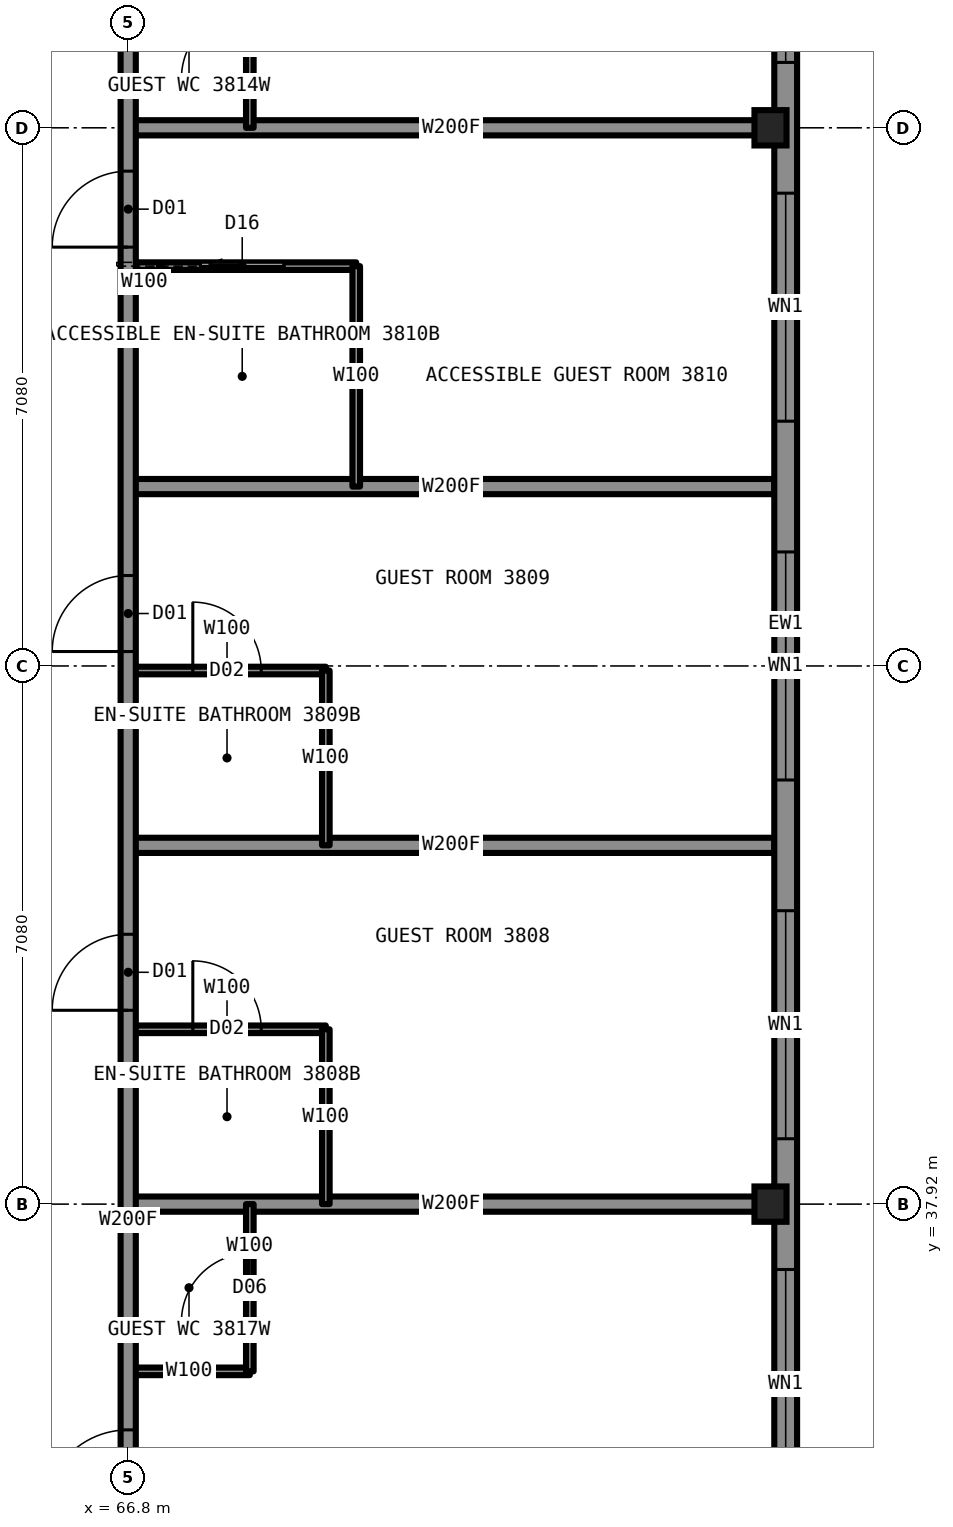
"""IFC4 building model, lengths in metres.
Left out: names, types, materials, properties, quantities, classifications, styles, units other than length and angle.
Written with IfcOpenShell. Run it as: python <this file> out.ifc"""

import sys

from ifc_helpers import new_model, si_unit, direction, frame, frame_2d, origin, origin_2d, place, context, subcontext, project, spatial, rectangle, i_section, extrude, element, fill, save


model = new_model("IFC4")
c1 = context("Model", 3, precision=1e-05, world=origin(), true_north=direction((0.0, 1.0)))
c2 = subcontext(c1, "Body", "Model", "MODEL_VIEW")
j1 = project(units=[si_unit("LENGTHUNIT", "METRE"), si_unit("PLANEANGLEUNIT", "RADIAN")], contexts=[c1])
p1 = place(None, origin())
s1 = spatial("IfcSite", under=j1, at=p1, CompositionType="ELEMENT")
p2 = place(p1, origin())
s2 = spatial("IfcBuilding", under=s1, at=p2, CompositionType="ELEMENT")
p3 = place(p2, frame((0.0, 0.0, 135.4)))
s3 = spatial("IfcBuildingStorey", under=s2, at=p3, CompositionType="ELEMENT", Elevation=135.4)
for number, where, z_axis, x_axis in (
    (1, (75.25, 37.92, 0.0), (0.0, 0.0, 1.0), (1.0, 0.0, 0.0)),
    (2, (75.25, 52.08, 0.0), (0.0, 0.0, 1.0), (1.0, 0.0, 0.0)),
):
    element("IfcColumn", number, at=place(p3, frame(where, z_axis=z_axis, x_axis=x_axis)), inside=s3, PredefinedType="COLUMN", context=c2, shape_type="SweptSolid", body=[
        extrude(i_section(OverallWidth=0.422, OverallDepth=0.465, WebThickness=0.045, FlangeThickness=0.073, at=origin_2d()), origin(), (0.0, 0.0, 1.0), 3.5),
    ])
p4 = place(p3, frame((66.8, 44.94, 0.0), z_axis=(0.0, 0.0, 1.0), x_axis=(1.0, 0.0, 0.0)))
e3 = element("IfcWall", 3, at=p4, inside=s3, PredefinedType="PARTITIONING", context=c2, shape_type="SweptSolid", body=[
    extrude(rectangle(XDim=2.6, YDim=0.1, at=frame_2d((1.3, 0.0))), origin(), (0.0, 0.0, 1.0), 2.731),
])
p5 = place(p4, frame((0.85, 0.0, 0.0)))
e4 = element("IfcOpeningElement", 4, at=p5, cuts=e3, PredefinedType="OPENING", context=c2, shape_type="SweptSolid", body=[
    extrude(rectangle(XDim=0.9, YDim=2.1, at=frame_2d((0.45, 1.05))), frame((0.0, 0.06, 0.0), z_axis=(0.0, -1.0, 0.0), x_axis=(1.0, 0.0, 0.0)), (0.0, 0.0, 1.0), 0.12),
])
p6 = place(p3, frame((66.8, 42.64, 0.0), z_axis=(0.0, 0.0, 1.0), x_axis=(1.0, 0.0, 0.0)))
e5 = element("IfcWall", 5, at=p6, inside=s3, PredefinedType="PARTITIONING", context=c2, shape_type="SweptSolid", body=[
    extrude(rectangle(XDim=8.5, YDim=0.2, at=frame_2d((4.25, 0.0))), origin(), (0.0, 0.0, 1.0), 2.731),
])
p7 = place(p3, frame((66.8, 40.22, 0.0), z_axis=(0.0, 0.0, 1.0), x_axis=(1.0, 0.0, 0.0)))
e6 = element("IfcWall", 6, at=p7, inside=s3, PredefinedType="PARTITIONING", context=c2, shape_type="SweptSolid", body=[
    extrude(rectangle(XDim=2.6, YDim=0.1, at=frame_2d((1.3, 0.0))), origin(), (0.0, 0.0, 1.0), 2.731),
])
p8 = place(p7, frame((0.85, 0.0, 0.0)))
e7 = element("IfcOpeningElement", 7, at=p8, cuts=e6, PredefinedType="OPENING", context=c2, shape_type="SweptSolid", body=[
    extrude(rectangle(XDim=0.9, YDim=2.1, at=frame_2d((0.45, 1.05))), frame((0.0, 0.06, 0.0), z_axis=(0.0, -1.0, 0.0), x_axis=(1.0, 0.0, 0.0)), (0.0, 0.0, 1.0), 0.12),
])
p9 = place(p3, frame((66.8, 37.92, 0.0), z_axis=(0.0, 0.0, 1.0), x_axis=(1.0, 0.0, 0.0)))
e8 = element("IfcWall", 8, at=p9, inside=s3, PredefinedType="PARTITIONING", context=c2, shape_type="SweptSolid", body=[
    extrude(rectangle(XDim=8.5, YDim=0.2, at=frame_2d((4.25, 0.0))), origin(), (0.0, 0.0, 1.0), 2.573),
])
p10 = place(p3, frame((66.8, 35.72, 0.0), z_axis=(0.0, 0.0, 1.0), x_axis=(1.0, 0.0, 0.0)))
e9 = element("IfcWall", 9, at=p10, inside=s3, PredefinedType="PARTITIONING", context=c2, shape_type="SweptSolid", body=[
    extrude(rectangle(XDim=1.6, YDim=0.1, at=frame_2d((0.8, 0.0))), origin(), (0.0, 0.0, 1.0), 3.33),
])
p11 = place(p3, frame((66.8, 47.36, 0.0), z_axis=(0.0, 0.0, 1.0), x_axis=(1.0, 0.0, 0.0)))
e10 = element("IfcWall", 10, at=p11, inside=s3, PredefinedType="PARTITIONING", context=c2, shape_type="SweptSolid", body=[
    extrude(rectangle(XDim=8.5, YDim=0.2, at=frame_2d((4.25, 0.0))), origin(), (0.0, 0.0, 1.0), 2.731),
])
p12 = place(p3, frame((66.8, 50.26, 0.0), z_axis=(0.0, 0.0, 1.0), x_axis=(1.0, 0.0, 0.0)))
e11 = element("IfcWall", 11, at=p12, inside=s3, PredefinedType="PARTITIONING", context=c2, shape_type="SweptSolid", body=[
    extrude(rectangle(XDim=3.0, YDim=0.1, at=frame_2d((1.5, 0.0))), origin(), (0.0, 0.0, 1.0), 3.33),
])
p13 = place(p12, frame((0.95, 0.0, 0.0)))
e12 = element("IfcOpeningElement", 12, at=p13, cuts=e11, PredefinedType="OPENING", context=c2, shape_type="SweptSolid", body=[
    extrude(rectangle(XDim=1.1, YDim=2.1, at=frame_2d((0.55, 1.05))), frame((0.0, 0.06, 0.0), z_axis=(0.0, -1.0, 0.0), x_axis=(1.0, 0.0, 0.0)), (0.0, 0.0, 1.0), 0.12),
])
p14 = place(p3, frame((66.8, 52.08, 0.0), z_axis=(0.0, 0.0, 1.0), x_axis=(1.0, 0.0, 0.0)))
e13 = element("IfcWall", 13, at=p14, inside=s3, PredefinedType="PARTITIONING", context=c2, shape_type="SweptSolid", body=[
    extrude(rectangle(XDim=8.5, YDim=0.2, at=frame_2d((4.25, 0.0))), origin(), (0.0, 0.0, 1.0), 2.573),
])
p15 = place(p3, frame((66.8, 33.2, 0.0), z_axis=(0.0, 0.0, 1.0), x_axis=(0.0, 1.0, 0.0)))
e14 = element("IfcWall", 14, at=p15, inside=s3, PredefinedType="PARTITIONING", context=c2, shape_type="SweptSolid", body=[
    extrude(rectangle(XDim=23.6, YDim=0.2, at=frame_2d((11.8, 0.0))), origin(), (0.0, 0.0, 1.0), 3.33),
])
p16 = place(p15, frame((7.27, 0.0, 0.0)))
e15 = element("IfcOpeningElement", 15, at=p16, cuts=e14, PredefinedType="OPENING", context=c2, shape_type="SweptSolid", body=[
    extrude(rectangle(XDim=1.0, YDim=2.2, at=frame_2d((0.5, 1.1))), frame((0.0, 0.11, 0.0), z_axis=(0.0, -1.0, 0.0), x_axis=(1.0, 0.0, 0.0)), (0.0, 0.0, 1.0), 0.22),
])
p17 = place(p15, frame((11.99, 0.0, 0.0)))
e16 = element("IfcOpeningElement", 16, at=p17, cuts=e14, PredefinedType="OPENING", context=c2, shape_type="SweptSolid", body=[
    extrude(rectangle(XDim=1.0, YDim=2.2, at=frame_2d((0.5, 1.1))), frame((0.0, 0.11, 0.0), z_axis=(0.0, -1.0, 0.0), x_axis=(1.0, 0.0, 0.0)), (0.0, 0.0, 1.0), 0.22),
])
p18 = place(p15, frame((17.31, 0.0, 0.0)))
e17 = element("IfcOpeningElement", 17, at=p18, cuts=e14, PredefinedType="OPENING", context=c2, shape_type="SweptSolid", body=[
    extrude(rectangle(XDim=1.0, YDim=2.2, at=frame_2d((0.5, 1.1))), frame((0.0, 0.11, 0.0), z_axis=(0.0, -1.0, 0.0), x_axis=(1.0, 0.0, 0.0)), (0.0, 0.0, 1.0), 0.22),
])
p19 = place(p15, frame((21.85, 0.0, 0.0)))
e18 = element("IfcOpeningElement", 18, at=p19, cuts=e14, PredefinedType="OPENING", context=c2, shape_type="SweptSolid", body=[
    extrude(rectangle(XDim=1.1, YDim=2.2, at=frame_2d((0.55, 1.1))), frame((0.0, 0.11, 0.0), z_axis=(0.0, -1.0, 0.0), x_axis=(1.0, 0.0, 0.0)), (0.0, 0.0, 1.0), 0.22),
])
p20 = place(p15, frame((0.65, 0.0, 0.0)))
e19 = element("IfcOpeningElement", 19, at=p20, cuts=e14, PredefinedType="OPENING", context=c2, shape_type="SweptSolid", body=[
    extrude(rectangle(XDim=1.1, YDim=2.2, at=frame_2d((0.55, 1.1))), frame((0.0, 0.11, 0.0), z_axis=(0.0, -1.0, 0.0), x_axis=(1.0, 0.0, 0.0)), (0.0, 0.0, 1.0), 0.22),
])
p21 = place(p3, frame((68.4, 35.72, 0.0), z_axis=(0.0, 0.0, 1.0), x_axis=(0.0, 1.0, 0.0)))
e20 = element("IfcWall", 20, at=p21, inside=s3, PredefinedType="PARTITIONING", context=c2, shape_type="SweptSolid", body=[
    extrude(rectangle(XDim=2.2, YDim=0.1, at=frame_2d((1.1, 0.0))), origin(), (0.0, 0.0, 1.0), 3.33),
])
p22 = place(p21, frame((0.65, 0.0, 0.0)))
e21 = element("IfcOpeningElement", 21, at=p22, cuts=e20, PredefinedType="OPENING", context=c2, shape_type="SweptSolid", body=[
    extrude(rectangle(XDim=0.9, YDim=2.1, at=frame_2d((0.45, 1.05))), frame((0.0, 0.06, 0.0), z_axis=(0.0, -1.0, 0.0), x_axis=(1.0, 0.0, 0.0)), (0.0, 0.0, 1.0), 0.12),
])
p23 = place(p3, frame((68.4, 52.08, 0.0), z_axis=(0.0, 0.0, 1.0), x_axis=(0.0, 1.0, 0.0)))
e22 = element("IfcWall", 22, at=p23, inside=s3, PredefinedType="PARTITIONING", context=c2, shape_type="SweptSolid", body=[
    extrude(rectangle(XDim=2.2, YDim=0.1, at=frame_2d((1.1, 0.0))), origin(), (0.0, 0.0, 1.0), 3.33),
])
p24 = place(p23, frame((0.65, 0.0, 0.0)))
e23 = element("IfcOpeningElement", 23, at=p24, cuts=e22, PredefinedType="OPENING", context=c2, shape_type="SweptSolid", body=[
    extrude(rectangle(XDim=0.9, YDim=2.1, at=frame_2d((0.45, 1.05))), frame((0.0, 0.06, 0.0), z_axis=(0.0, -1.0, 0.0), x_axis=(1.0, 0.0, 0.0)), (0.0, 0.0, 1.0), 0.12),
])
for number, where, z_axis, x_axis in (
    (24, (69.4, 37.92, 0.0), (0.0, 0.0, 1.0), (0.0, 1.0, 0.0)),
    (25, (69.4, 42.64, 0.0), (0.0, 0.0, 1.0), (0.0, 1.0, 0.0)),
):
    element("IfcWall", number, at=place(p3, frame(where, z_axis=z_axis, x_axis=x_axis)), inside=s3, PredefinedType="PARTITIONING", context=c2, shape_type="SweptSolid", body=[
        extrude(rectangle(XDim=2.3, YDim=0.1, at=frame_2d((1.15, 0.0))), origin(), (0.0, 0.0, 1.0), 3.33),
    ])
p25 = place(p3, frame((69.8, 47.36, 0.0), z_axis=(0.0, 0.0, 1.0), x_axis=(0.0, 1.0, 0.0)))
e26 = element("IfcWall", 26, at=p25, inside=s3, PredefinedType="PARTITIONING", context=c2, shape_type="SweptSolid", body=[
    extrude(rectangle(XDim=2.9, YDim=0.1, at=frame_2d((1.45, 0.0))), origin(), (0.0, 0.0, 1.0), 3.33),
])
p26 = place(p3, frame((75.45, 29.9, 0.0), z_axis=(0.0, 0.0, 1.0), x_axis=(0.0, 1.0, 0.0)))
e27 = element("IfcWall", 27, at=p26, inside=s3, PredefinedType="SOLIDWALL", context=c2, shape_type="SweptSolid", body=[
    extrude(rectangle(XDim=30.2, YDim=0.3, at=frame_2d((15.1, 0.0))), origin(), (0.0, 0.0, 1.0), 2.83),
])
p27 = place(p26, frame((0.85, 0.0, 0.5)))
e28 = element("IfcOpeningElement", 28, at=p27, cuts=e27, PredefinedType="OPENING", context=c2, shape_type="SweptSolid", body=[
    extrude(rectangle(XDim=1.6, YDim=2.0, at=frame_2d((0.8, 1.0))), frame((0.0, 0.16, 0.0), z_axis=(0.0, -1.0, 0.0), x_axis=(1.0, 0.0, 0.0)), (0.0, 0.0, 1.0), 0.32),
])
p28 = place(p26, frame((4.16, 0.0, 0.5)))
e29 = element("IfcOpeningElement", 29, at=p28, cuts=e27, PredefinedType="OPENING", context=c2, shape_type="SweptSolid", body=[
    extrude(rectangle(XDim=1.3, YDim=1.9, at=frame_2d((0.65, 0.95))), frame((0.0, 0.16, 0.0), z_axis=(0.0, -1.0, 0.0), x_axis=(1.0, 0.0, 0.0)), (0.0, 0.0, 1.0), 0.32),
])
p29 = place(p26, frame((8.88, 0.0, 0.5)))
e30 = element("IfcOpeningElement", 30, at=p29, cuts=e27, PredefinedType="OPENING", context=c2, shape_type="SweptSolid", body=[
    extrude(rectangle(XDim=3.0, YDim=2.0, at=frame_2d((1.5, 1.0))), frame((0.0, 0.16, 0.0), z_axis=(0.0, -1.0, 0.0), x_axis=(1.0, 0.0, 0.0)), (0.0, 0.0, 1.0), 0.32),
])
p30 = place(p26, frame((13.6, 0.0, 0.5)))
e31 = element("IfcOpeningElement", 31, at=p30, cuts=e27, PredefinedType="OPENING", context=c2, shape_type="SweptSolid", body=[
    extrude(rectangle(XDim=3.0, YDim=2.0, at=frame_2d((1.5, 1.0))), frame((0.0, 0.16, 0.0), z_axis=(0.0, -1.0, 0.0), x_axis=(1.0, 0.0, 0.0)), (0.0, 0.0, 1.0), 0.32),
])
p31 = place(p26, frame((18.32, 0.0, 0.5)))
e32 = element("IfcOpeningElement", 32, at=p31, cuts=e27, PredefinedType="OPENING", context=c2, shape_type="SweptSolid", body=[
    extrude(rectangle(XDim=3.0, YDim=2.0, at=frame_2d((1.5, 1.0))), frame((0.0, 0.16, 0.0), z_axis=(0.0, -1.0, 0.0), x_axis=(1.0, 0.0, 0.0)), (0.0, 0.0, 1.0), 0.32),
])
p32 = place(p26, frame((24.69, 0.0, 0.5)))
e33 = element("IfcOpeningElement", 33, at=p32, cuts=e27, PredefinedType="OPENING", context=c2, shape_type="SweptSolid", body=[
    extrude(rectangle(XDim=1.3, YDim=1.9, at=frame_2d((0.65, 0.95))), frame((0.0, 0.16, 0.0), z_axis=(0.0, -1.0, 0.0), x_axis=(1.0, 0.0, 0.0)), (0.0, 0.0, 1.0), 0.32),
])
p33 = place(p26, frame((27.75, 0.0, 0.5)))
e34 = element("IfcOpeningElement", 34, at=p33, cuts=e27, PredefinedType="OPENING", context=c2, shape_type="SweptSolid", body=[
    extrude(rectangle(XDim=1.6, YDim=2.0, at=frame_2d((0.8, 1.0))), frame((0.0, 0.16, 0.0), z_axis=(0.0, -1.0, 0.0), x_axis=(1.0, 0.0, 0.0)), (0.0, 0.0, 1.0), 0.32),
])
p34 = place(p26, frame((5.51, 0.0, 0.5)))
e35 = element("IfcOpeningElement", 35, at=p34, cuts=e27, PredefinedType="OPENING", context=c2, shape_type="SweptSolid", body=[
    extrude(rectangle(XDim=0.7, YDim=0.9, at=frame_2d((0.35, 0.45))), frame((0.0, 0.16, 0.0), z_axis=(0.0, -1.0, 0.0), x_axis=(1.0, 0.0, 0.0)), (0.0, 0.0, 1.0), 0.32),
])
p35 = place(p26, frame((23.99, 0.0, 0.5)))
e36 = element("IfcOpeningElement", 36, at=p35, cuts=e27, PredefinedType="OPENING", context=c2, shape_type="SweptSolid", body=[
    extrude(rectangle(XDim=0.7, YDim=0.9, at=frame_2d((0.35, 0.45))), frame((0.0, 0.16, 0.0), z_axis=(0.0, -1.0, 0.0), x_axis=(1.0, 0.0, 0.0)), (0.0, 0.0, 1.0), 0.32),
])
p36 = place(p16, origin())
e37 = element("IfcDoor", 37, at=p36, inside=s3, OperationType="SINGLE_SWING_LEFT", PredefinedType="DOOR", context=c2, shape_type="SweptSolid", body=[
    extrude(rectangle(XDim=1.0, YDim=2.2, at=frame_2d((0.5, 1.1))), frame((0.0, 0.025, 0.0), z_axis=(0.0, -1.0, 0.0), x_axis=(1.0, 0.0, 0.0)), (0.0, 0.0, 1.0), 0.05),
])
fill(e15, e37)
p37 = place(p8, origin())
e38 = element("IfcDoor", 38, at=p37, inside=s3, OperationType="SINGLE_SWING_RIGHT", PredefinedType="DOOR", context=c2, shape_type="SweptSolid", body=[
    extrude(rectangle(XDim=0.9, YDim=2.1, at=frame_2d((0.45, 1.05))), frame((0.0, 0.025, 0.0), z_axis=(0.0, -1.0, 0.0), x_axis=(1.0, 0.0, 0.0)), (0.0, 0.0, 1.0), 0.05),
])
fill(e7, e38)
p38 = place(p17, origin())
e39 = element("IfcDoor", 39, at=p38, inside=s3, OperationType="SINGLE_SWING_LEFT", PredefinedType="DOOR", context=c2, shape_type="SweptSolid", body=[
    extrude(rectangle(XDim=1.0, YDim=2.2, at=frame_2d((0.5, 1.1))), frame((0.0, 0.025, 0.0), z_axis=(0.0, -1.0, 0.0), x_axis=(1.0, 0.0, 0.0)), (0.0, 0.0, 1.0), 0.05),
])
fill(e16, e39)
p39 = place(p5, origin())
e40 = element("IfcDoor", 40, at=p39, inside=s3, OperationType="SINGLE_SWING_RIGHT", PredefinedType="DOOR", context=c2, shape_type="SweptSolid", body=[
    extrude(rectangle(XDim=0.9, YDim=2.1, at=frame_2d((0.45, 1.05))), frame((0.0, 0.025, 0.0), z_axis=(0.0, -1.0, 0.0), x_axis=(1.0, 0.0, 0.0)), (0.0, 0.0, 1.0), 0.05),
])
fill(e4, e40)
p40 = place(p18, origin())
e41 = element("IfcDoor", 41, at=p40, inside=s3, OperationType="SINGLE_SWING_LEFT", PredefinedType="DOOR", context=c2, shape_type="SweptSolid", body=[
    extrude(rectangle(XDim=1.0, YDim=2.2, at=frame_2d((0.5, 1.1))), frame((0.0, 0.025, 0.0), z_axis=(0.0, -1.0, 0.0), x_axis=(1.0, 0.0, 0.0)), (0.0, 0.0, 1.0), 0.05),
])
fill(e17, e41)
p41 = place(p13, origin())
e42 = element("IfcDoor", 42, at=p41, inside=s3, OperationType="SLIDING_TO_LEFT", PredefinedType="DOOR", context=c2, shape_type="SweptSolid", body=[
    extrude(rectangle(XDim=1.1, YDim=2.1, at=frame_2d((0.55, 1.05))), frame((0.0, 0.025, 0.0), z_axis=(0.0, -1.0, 0.0), x_axis=(1.0, 0.0, 0.0)), (0.0, 0.0, 1.0), 0.05),
])
fill(e12, e42)
p42 = place(p24, origin())
e43 = element("IfcDoor", 43, at=p42, inside=s3, OperationType="SINGLE_SWING_LEFT", PredefinedType="DOOR", context=c2, shape_type="SweptSolid", body=[
    extrude(rectangle(XDim=0.9, YDim=2.1, at=frame_2d((0.45, 1.05))), frame((0.0, 0.025, 0.0), z_axis=(0.0, -1.0, 0.0), x_axis=(1.0, 0.0, 0.0)), (0.0, 0.0, 1.0), 0.05),
])
fill(e23, e43)
p43 = place(p20, origin())
e44 = element("IfcDoor", 44, at=p43, inside=s3, OperationType="SINGLE_SWING_LEFT", PredefinedType="DOOR", context=c2, shape_type="SweptSolid", body=[
    extrude(rectangle(XDim=1.1, YDim=2.2, at=frame_2d((0.55, 1.1))), frame((0.0, 0.025, 0.0), z_axis=(0.0, -1.0, 0.0), x_axis=(1.0, 0.0, 0.0)), (0.0, 0.0, 1.0), 0.05),
])
fill(e19, e44)
p44 = place(p22, origin())
e45 = element("IfcDoor", 45, at=p44, inside=s3, OperationType="SINGLE_SWING_LEFT", PredefinedType="DOOR", context=c2, shape_type="SweptSolid", body=[
    extrude(rectangle(XDim=0.9, YDim=2.1, at=frame_2d((0.45, 1.05))), frame((0.0, 0.025, 0.0), z_axis=(0.0, -1.0, 0.0), x_axis=(1.0, 0.0, 0.0)), (0.0, 0.0, 1.0), 0.05),
])
fill(e21, e45)
p45 = place(p28, origin())
e46 = element("IfcWindow", 46, at=p45, inside=s3, PartitioningType="SINGLE_PANEL", PredefinedType="WINDOW", context=c2, shape_type="SweptSolid", body=[
    extrude(rectangle(XDim=1.3, YDim=1.9, at=frame_2d((0.65, 0.95))), frame((0.0, 0.03, 0.0), z_axis=(0.0, -1.0, 0.0), x_axis=(1.0, 0.0, 0.0)), (0.0, 0.0, 1.0), 0.06),
])
fill(e29, e46)
p46 = place(p29, origin())
e47 = element("IfcWindow", 47, at=p46, inside=s3, PartitioningType="SINGLE_PANEL", PredefinedType="WINDOW", context=c2, shape_type="SweptSolid", body=[
    extrude(rectangle(XDim=3.0, YDim=2.0, at=frame_2d((1.5, 1.0))), frame((0.0, 0.03, 0.0), z_axis=(0.0, -1.0, 0.0), x_axis=(1.0, 0.0, 0.0)), (0.0, 0.0, 1.0), 0.06),
])
fill(e30, e47)
p47 = place(p30, origin())
e48 = element("IfcWindow", 48, at=p47, inside=s3, PartitioningType="SINGLE_PANEL", PredefinedType="WINDOW", context=c2, shape_type="SweptSolid", body=[
    extrude(rectangle(XDim=3.0, YDim=2.0, at=frame_2d((1.5, 1.0))), frame((0.0, 0.03, 0.0), z_axis=(0.0, -1.0, 0.0), x_axis=(1.0, 0.0, 0.0)), (0.0, 0.0, 1.0), 0.06),
])
fill(e31, e48)
p48 = place(p31, origin())
e49 = element("IfcWindow", 49, at=p48, inside=s3, PartitioningType="SINGLE_PANEL", PredefinedType="WINDOW", context=c2, shape_type="SweptSolid", body=[
    extrude(rectangle(XDim=3.0, YDim=2.0, at=frame_2d((1.5, 1.0))), frame((0.0, 0.03, 0.0), z_axis=(0.0, -1.0, 0.0), x_axis=(1.0, 0.0, 0.0)), (0.0, 0.0, 1.0), 0.06),
])
fill(e32, e49)
p49 = place(p34, origin())
e50 = element("IfcWindow", 50, at=p49, inside=s3, PartitioningType="SINGLE_PANEL", PredefinedType="WINDOW", context=c2, shape_type="SweptSolid", body=[
    extrude(rectangle(XDim=0.7, YDim=0.9, at=frame_2d((0.35, 0.45))), frame((0.0, 0.03, 0.0), z_axis=(0.0, -1.0, 0.0), x_axis=(1.0, 0.0, 0.0)), (0.0, 0.0, 1.0), 0.06),
])
fill(e35, e50)
save(model, sys.argv[1])
